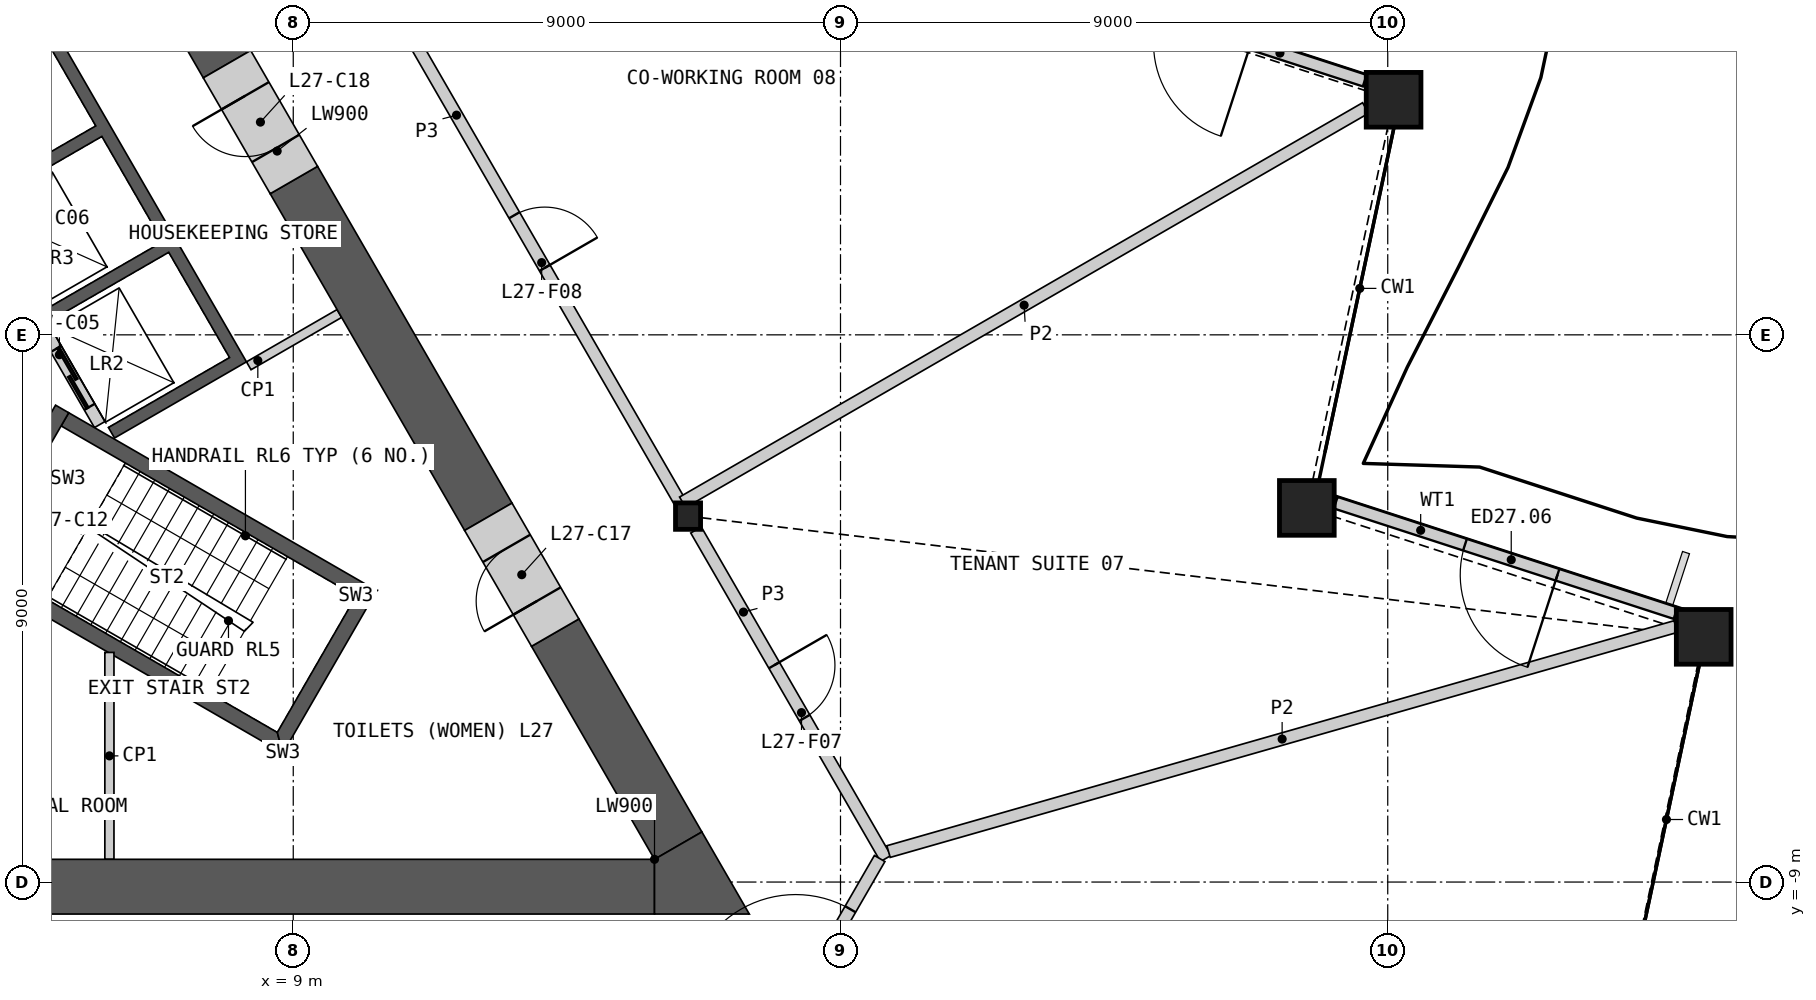
"""IFC4 building model, lengths in metres.
Left out: names, types, materials, properties, quantities, classifications, styles, units other than length and angle.
Written with IfcOpenShell. Run it as: python <this file> out.ifc"""

import sys

from ifc_helpers import new_model, si_unit, direction, frame, frame_2d, origin, origin_2d, place, context, subcontext, project, spatial, polyline, rectangle, hollow_rectangle, i_section, outline, extrude, element, fill, save


model = new_model("IFC4")
c1 = context("Model", 3, precision=1e-05, world=origin(), true_north=direction((0.0, 1.0)))
c2 = subcontext(c1, "Body", "Model", "MODEL_VIEW")
j1 = project(units=[si_unit("LENGTHUNIT", "METRE"), si_unit("PLANEANGLEUNIT", "RADIAN")], contexts=[c1])
p1 = place(None, origin())
s1 = spatial("IfcSite", under=j1, at=p1, CompositionType="ELEMENT")
p2 = place(p1, origin())
s2 = spatial("IfcBuilding", under=s1, at=p2, CompositionType="ELEMENT")
p3 = place(p2, frame((0.0, 0.0, 129.0)))
s3 = spatial("IfcBuildingStorey", under=s2, at=p3, CompositionType="ELEMENT", Elevation=129.0)
for number, where, z_axis, x_axis in (
    (1, (32.196, -4.967, 0.0), (0.0, 0.0, 1.0), (1.0, 0.0, 0.0)),
    (2, (25.669, -2.846, 0.0), (0.0, 0.0, 1.0), (1.0, 0.0, 0.0)),
    (3, (27.096, 3.866, 0.0), (0.0, 0.0, 1.0), (1.0, 0.0, 0.0)),
):
    element("IfcColumn", number, at=place(p3, frame(where, z_axis=z_axis, x_axis=x_axis)), inside=s3, PredefinedType="COLUMN", context=c2, shape_type="SweptSolid", body=[
        extrude(hollow_rectangle(XDim=0.9, YDim=0.9, WallThickness=0.06, at=origin_2d()), origin(), (0.0, 0.0, 1.0), 4.2),
    ])
p4 = place(p3, frame((15.493, -2.982, 0.0), z_axis=(0.0, 0.0, 1.0), x_axis=(1.0, 0.0, 0.0)))
e4 = element("IfcColumn", 4, at=p4, inside=s3, PredefinedType="COLUMN", context=c2, shape_type="SweptSolid", body=[
    extrude(i_section(OverallWidth=0.412, OverallDepth=0.435, WebThickness=0.036, FlangeThickness=0.057, at=origin_2d()), origin(), (0.0, 0.0, 1.0), 4.2),
])
p5 = place(p3, frame((31.734, -4.577, 0.0), z_axis=(0.0, 0.0, 1.0), x_axis=(-0.951060927669, 0.309003417231, 0.0)))
e5 = element("IfcWall", 5, at=p5, inside=s3, PredefinedType="SOLIDWALL", context=c2, shape_type="SweptSolid", body=[
    extrude(rectangle(XDim=5.877, YDim=0.2, at=frame_2d((2.939, 0.0))), origin(), (0.0, 0.0, 1.0), 3.189),
])
p6 = place(p5, frame((2.042, 0.0, 0.0)))
e6 = element("IfcOpeningElement", 6, at=p6, cuts=e5, PredefinedType="OPENING", context=c2, shape_type="SweptSolid", body=[
    extrude(rectangle(XDim=1.6, YDim=2.4, at=frame_2d((0.8, 1.2))), frame((0.0, 0.11, 0.0), z_axis=(0.0, -1.0, 0.0), x_axis=(1.0, 0.0, 0.0)), (0.0, 0.0, 1.0), 0.22),
])
p7 = place(p3, frame((26.622, 4.181, 0.0), z_axis=(0.0, 0.0, 1.0), x_axis=(-0.951053952554, 0.309024884649, 0.0)))
e7 = element("IfcWall", 7, at=p7, inside=s3, PredefinedType="SOLIDWALL", context=c2, shape_type="SweptSolid", body=[
    extrude(rectangle(XDim=5.865, YDim=0.2, at=frame_2d((2.932, 0.0))), origin(), (0.0, 0.0, 1.0), 3.189),
])
p8 = place(p7, frame((1.969, 0.0, 0.0)))
e8 = element("IfcOpeningElement", 8, at=p8, cuts=e7, PredefinedType="OPENING", context=c2, shape_type="SweptSolid", body=[
    extrude(rectangle(XDim=1.6, YDim=2.4, at=frame_2d((0.8, 1.2))), frame((0.0, 0.11, 0.0), z_axis=(0.0, -1.0, 0.0), x_axis=(1.0, 0.0, 0.0)), (0.0, 0.0, 1.0), 0.22),
])
p9 = place(p3, origin())
e9 = element("IfcWall", 9, at=p9, inside=s3, PredefinedType="SHEAR", context=c2, shape_type="SweptSolid", body=[
    extrude(outline(polyline([(2.66, 4.192), (4.831, 5.445), (8.231, -0.444), (6.061, -1.697), (5.96, -1.524), (7.952, -0.374), (6.952, 1.358), (4.96, 0.208), (4.861, 0.381), (6.852, 1.531), (5.852, 3.263), (3.861, 2.113), (3.76, 2.287), (5.752, 3.437), (4.752, 5.169), (2.76, 4.019), (2.66, 4.192)])), origin(), (0.0, 0.0, 1.0), 3.8),
])
p10 = place(p3, frame((5.817, -1.476, 0.0), z_axis=(0.0, 0.0, 1.0), x_axis=(-0.500002616675, 0.866023893041, 0.0)))
e10 = element("IfcWall", 10, at=p10, inside=s3, PredefinedType="SOLIDWALL", context=c2, shape_type="SweptSolid", body=[
    extrude(rectangle(XDim=8.373, YDim=0.2, at=frame_2d((4.187, 0.0))), origin(), (0.0, 0.0, 1.0), 3.8),
])
p11 = place(p10, frame((0.337, 0.0, 0.0)))
e11 = element("IfcOpeningElement", 11, at=p11, cuts=e10, PredefinedType="OPENING", context=c2, shape_type="SweptSolid", body=[
    extrude(rectangle(XDim=1.1, YDim=2.1, at=frame_2d((0.55, 1.05))), frame((0.0, 0.11, 0.0), z_axis=(0.0, -1.0, 0.0), x_axis=(1.0, 0.0, 0.0)), (0.0, 0.0, 1.0), 0.22),
])
p12 = place(p10, frame((2.537, 0.0, 0.0)))
e12 = element("IfcOpeningElement", 12, at=p12, cuts=e10, PredefinedType="OPENING", context=c2, shape_type="SweptSolid", body=[
    extrude(rectangle(XDim=1.1, YDim=2.1, at=frame_2d((0.55, 1.05))), frame((0.0, 0.11, 0.0), z_axis=(0.0, -1.0, 0.0), x_axis=(1.0, 0.0, 0.0)), (0.0, 0.0, 1.0), 0.22),
])
p13 = place(p10, frame((4.737, 0.0, 0.0)))
e13 = element("IfcOpeningElement", 13, at=p13, cuts=e10, PredefinedType="OPENING", context=c2, shape_type="SweptSolid", body=[
    extrude(rectangle(XDim=1.1, YDim=2.1, at=frame_2d((0.55, 1.05))), frame((0.0, 0.11, 0.0), z_axis=(0.0, -1.0, 0.0), x_axis=(1.0, 0.0, 0.0)), (0.0, 0.0, 1.0), 0.22),
])
p14 = place(p10, frame((7.037, 0.0, 0.0)))
e14 = element("IfcOpeningElement", 14, at=p14, cuts=e10, PredefinedType="OPENING", context=c2, shape_type="SweptSolid", body=[
    extrude(rectangle(XDim=0.9, YDim=2.1, at=frame_2d((0.45, 1.05))), frame((0.0, 0.11, 0.0), z_axis=(0.0, -1.0, 0.0), x_axis=(1.0, 0.0, 0.0)), (0.0, 0.0, 1.0), 0.22),
])
p15 = place(p3, origin())
e15 = element("IfcWall", 15, at=p15, inside=s3, PredefinedType="SHEAR", context=c2, shape_type="SweptSolid", body=[
    extrude(outline(polyline([(3.763, -3.956), (8.83, -6.881), (8.738, -6.539), (3.888, -3.739), (3.763, -3.956)])), origin(), (0.0, 0.0, 1.0), 3.8),
])
p16 = place(p3, origin())
e16 = element("IfcWall", 16, at=p16, inside=s3, PredefinedType="SHEAR", context=c2, shape_type="SweptSolid", body=[
    extrude(outline(polyline([(8.83, -6.881), (10.374, -4.206), (10.032, -4.298), (8.738, -6.539), (8.83, -6.881)])), origin(), (0.0, 0.0, 1.0), 3.8),
])
p17 = place(p3, origin())
e17 = element("IfcWall", 17, at=p17, inside=s3, PredefinedType="SHEAR", context=c2, shape_type="SweptSolid", body=[
    extrude(outline(polyline([(10.032, -4.298), (10.374, -4.206), (5.307, -1.281), (5.182, -1.498), (10.032, -4.298)])), origin(), (0.0, 0.0, 1.0), 3.8),
])
p18 = place(p3, frame((3.655, -3.893, 0.0), z_axis=(0.0, 0.0, 1.0), x_axis=(0.499982516597, 0.866035497597, 0.0)))
e18 = element("IfcWall", 18, at=p18, inside=s3, PredefinedType="SHEAR", context=c2, shape_type="SweptSolid", body=[
    extrude(rectangle(XDim=3.088, YDim=0.25, at=frame_2d((1.544, 0.0))), origin(), (0.0, 0.0, 1.0), 3.8),
])
p19 = place(p18, frame((0.994, 0.0, 0.0)))
e19 = element("IfcOpeningElement", 19, at=p19, cuts=e18, PredefinedType="OPENING", context=c2, shape_type="SweptSolid", body=[
    extrude(rectangle(XDim=1.1, YDim=2.1, at=frame_2d((0.55, 1.05))), frame((0.0, 0.135, 0.0), z_axis=(0.0, -1.0, 0.0), x_axis=(1.0, 0.0, 0.0)), (0.0, 0.0, 1.0), 0.27),
])
p20 = place(p3, frame((8.268, -0.509, 0.0), z_axis=(0.0, 0.0, 1.0), x_axis=(0.866024871741, 0.500000921525, 0.0)))
e20 = element("IfcWall", 20, at=p20, inside=s3, PredefinedType="PARTITIONING", context=c2, shape_type="SweptSolid", body=[
    extrude(rectangle(XDim=1.72, YDim=0.15, at=frame_2d((0.86, 0.0))), origin(), (0.0, 0.0, 1.0), 3.8),
])
p21 = place(p3, frame((5.977, -8.626, 0.0), z_axis=(0.0, 0.0, 1.0), x_axis=(0.0, 1.0, 0.0)))
e21 = element("IfcWall", 21, at=p21, inside=s3, PredefinedType="PARTITIONING", context=c2, shape_type="SweptSolid", body=[
    extrude(rectangle(XDim=3.403, YDim=0.15, at=frame_2d((1.701, 0.0))), origin(), (0.0, 0.0, 1.0), 3.8),
])
p22 = place(p3, frame((3.913, -9.076, 0.0), z_axis=(0.0, 0.0, 1.0), x_axis=(1.0, 0.0, 0.0)))
e22 = element("IfcWall", 22, at=p22, inside=s3, PredefinedType="SHEAR", context=c2, shape_type="SweptSolid", body=[
    extrude(rectangle(XDim=11.029, YDim=0.9, at=frame_2d((5.514, 0.0))), origin(), (0.0, 0.0, 1.0), 3.8),
])
p23 = place(p3, frame((7.91, 4.451, 0.0), z_axis=(0.0, 0.0, 1.0), x_axis=(-0.500001962043, 0.866024270995, 0.0)))
e23 = element("IfcWall", 23, at=p23, inside=s3, PredefinedType="SHEAR", context=c2, shape_type="SweptSolid", body=[
    extrude(rectangle(XDim=8.796, YDim=0.9, at=frame_2d((4.398, 0.0))), origin(), (0.0, 0.0, 1.0), 3.8),
])
p24 = place(p3, frame((12.208, -2.992, 0.0), z_axis=(0.0, 0.0, 1.0), x_axis=(-0.499990106751, 0.866031115579, 0.0)))
e24 = element("IfcWall", 24, at=p24, inside=s3, PredefinedType="SHEAR", context=c2, shape_type="SweptSolid", body=[
    extrude(rectangle(XDim=6.396, YDim=0.9, at=frame_2d((3.198, 0.0))), origin(), (0.0, 0.0, 1.0), 3.8),
])
p25 = place(p3, frame((15.331, -8.401, 0.0), z_axis=(0.0, 0.0, 1.0), x_axis=(-0.499974938593, 0.866039872511, 0.0)))
e25 = element("IfcWall", 25, at=p25, inside=s3, PredefinedType="SHEAR", context=c2, shape_type="SweptSolid", body=[
    extrude(rectangle(XDim=4.046, YDim=0.9, at=frame_2d((2.023, 0.0))), origin(), (0.0, 0.0, 1.0), 3.8),
])
p26 = place(p3, origin())
e26 = element("IfcWall", 26, at=p26, inside=s3, PredefinedType="SHEAR", context=c2, shape_type="SweptSolid", body=[
    extrude(outline(polyline([(14.941, -8.626), (15.721, -8.176), (16.5, -9.526), (14.941, -9.526), (14.941, -8.626)])), origin(), (0.0, 0.0, 1.0), 3.8),
])
p27 = place(p3, frame((13.308, -4.898, 0.0), z_axis=(0.0, 0.0, 1.0), x_axis=(-0.50002983664, 0.866008176907, 0.0)))
e27 = element("IfcWall", 27, at=p27, inside=s3, PredefinedType="SHEAR", context=c2, shape_type="SweptSolid", body=[
    extrude(rectangle(XDim=2.2, YDim=0.9, at=frame_2d((1.1, 0.0))), origin(), (0.0, 0.0, 1.0), 3.8),
])
p28 = place(p27, frame((0.6, 0.0, 0.0)))
e28 = element("IfcOpeningElement", 28, at=p28, cuts=e27, PredefinedType="OPENING", context=c2, shape_type="SweptSolid", body=[
    extrude(rectangle(XDim=1.0, YDim=2.1, at=frame_2d((0.5, 1.05))), frame((0.0, 0.46, 0.0), z_axis=(0.0, -1.0, 0.0), x_axis=(1.0, 0.0, 0.0)), (0.0, 0.0, 1.0), 0.92),
])
p29 = place(p3, frame((9.01, 2.546, 0.0), z_axis=(0.0, 0.0, 1.0), x_axis=(-0.499994660107, 0.866028486751, 0.0)))
e29 = element("IfcWall", 29, at=p29, inside=s3, PredefinedType="SHEAR", context=c2, shape_type="SweptSolid", body=[
    extrude(rectangle(XDim=2.2, YDim=0.9, at=frame_2d((1.1, 0.0))), origin(), (0.0, 0.0, 1.0), 3.8),
])
p30 = place(p29, frame((0.6, 0.0, 0.0)))
e30 = element("IfcOpeningElement", 30, at=p30, cuts=e29, PredefinedType="OPENING", context=c2, shape_type="SweptSolid", body=[
    extrude(rectangle(XDim=1.0, YDim=2.1, at=frame_2d((0.5, 1.05))), frame((0.0, 0.46, 0.0), z_axis=(0.0, -1.0, 0.0), x_axis=(1.0, 0.0, 0.0)), (0.0, 0.0, 1.0), 0.92),
])
p31 = place(p3, frame((10.46, 5.736, 0.0), z_axis=(0.0, 0.0, 1.0), x_axis=(0.500004141693, -0.866023012564, 0.0)))
e31 = element("IfcWall", 31, at=p31, inside=s3, PredefinedType="PARTITIONING", context=c2, shape_type="SweptSolid", body=[
    extrude(rectangle(XDim=9.803, YDim=0.2, at=frame_2d((4.902, 0.0))), origin(), (0.0, 0.0, 1.0), 3.8),
])
p32 = place(p31, frame((4.352, 0.0, 0.0)))
e32 = element("IfcOpeningElement", 32, at=p32, cuts=e31, PredefinedType="OPENING", context=c2, shape_type="SweptSolid", body=[
    extrude(rectangle(XDim=1.0, YDim=2.1, at=frame_2d((0.5, 1.05))), frame((0.0, 0.11, 0.0), z_axis=(0.0, -1.0, 0.0), x_axis=(1.0, 0.0, 0.0)), (0.0, 0.0, 1.0), 0.22),
])
p33 = place(p3, frame((15.624, -3.209, 0.0), z_axis=(0.0, 0.0, 1.0), x_axis=(0.499997920671, -0.866026604282, 0.0)))
e33 = element("IfcWall", 33, at=p33, inside=s3, PredefinedType="PARTITIONING", context=c2, shape_type="SweptSolid", body=[
    extrude(rectangle(XDim=6.24, YDim=0.2, at=frame_2d((3.12, 0.0))), origin(), (0.0, 0.0, 1.0), 3.8),
])
p34 = place(p33, frame((2.57, 0.0, 0.0)))
e34 = element("IfcOpeningElement", 34, at=p34, cuts=e33, PredefinedType="OPENING", context=c2, shape_type="SweptSolid", body=[
    extrude(rectangle(XDim=1.0, YDim=2.1, at=frame_2d((0.5, 1.05))), frame((0.0, 0.11, 0.0), z_axis=(0.0, -1.0, 0.0), x_axis=(1.0, 0.0, 0.0)), (0.0, 0.0, 1.0), 0.22),
])
p35 = place(p3, frame((16.781, -11.84, 0.0), z_axis=(0.0, 0.0, 1.0), x_axis=(0.499958791762, 0.866049194065, 0.0)))
e35 = element("IfcWall", 35, at=p35, inside=s3, PredefinedType="PARTITIONING", context=c2, shape_type="SweptSolid", body=[
    extrude(rectangle(XDim=3.726, YDim=0.2, at=frame_2d((1.863, 0.0))), origin(), (0.0, 0.0, 1.0), 3.8),
])
p36 = place(p35, frame((0.963, 0.0, 0.0)))
e36 = element("IfcOpeningElement", 36, at=p36, cuts=e35, PredefinedType="OPENING", context=c2, shape_type="SweptSolid", body=[
    extrude(rectangle(XDim=1.8, YDim=2.1, at=frame_2d((0.9, 1.05))), frame((0.0, 0.11, 0.0), z_axis=(0.0, -1.0, 0.0), x_axis=(1.0, 0.0, 0.0)), (0.0, 0.0, 1.0), 0.22),
])
p37 = place(p3, frame((18.79, -8.499, 0.0), z_axis=(0.0, 0.0, 1.0), x_axis=(0.961478776026, 0.274879179372, 0.0)))
e37 = element("IfcWall", 37, at=p37, inside=s3, PredefinedType="PARTITIONING", context=c2, shape_type="SweptSolid", body=[
    extrude(rectangle(XDim=13.465, YDim=0.2, at=frame_2d((6.732, 0.0))), origin(), (0.0, 0.0, 1.0), 2.885),
])
p38 = place(p3, frame((15.403, -2.754, 0.0), z_axis=(0.0, 0.0, 1.0), x_axis=(0.866024473704, 0.500001610943, 0.0)))
e38 = element("IfcWall", 38, at=p38, inside=s3, PredefinedType="PARTITIONING", context=c2, shape_type="SweptSolid", body=[
    extrude(rectangle(XDim=12.971, YDim=0.2, at=frame_2d((6.485, 0.0))), origin(), (0.0, 0.0, 1.0), 2.885),
])
p39 = place(p6, origin())
e39 = element("IfcDoor", 39, at=p39, inside=s3, OperationType="DOUBLE_DOOR_SINGLE_SWING", PredefinedType="DOOR", context=c2, shape_type="SweptSolid", body=[
    extrude(rectangle(XDim=1.6, YDim=2.4, at=frame_2d((0.8, 1.2))), frame((0.0, 0.025, 0.0), z_axis=(0.0, -1.0, 0.0), x_axis=(1.0, 0.0, 0.0)), (0.0, 0.0, 1.0), 0.05),
])
fill(e6, e39)
p40 = place(p11, origin())
e40 = element("IfcDoor", 40, at=p40, inside=s3, OperationType="SLIDING_TO_LEFT", PredefinedType="DOOR", context=c2, shape_type="SweptSolid", body=[
    extrude(rectangle(XDim=1.1, YDim=2.1, at=frame_2d((0.55, 1.05))), frame((0.0, 0.025, 0.0), z_axis=(0.0, -1.0, 0.0), x_axis=(1.0, 0.0, 0.0)), (0.0, 0.0, 1.0), 0.05),
])
fill(e11, e40)
p41 = place(p28, origin())
e41 = element("IfcDoor", 41, at=p41, inside=s3, OperationType="SINGLE_SWING_LEFT", PredefinedType="DOOR", context=c2, shape_type="SweptSolid", body=[
    extrude(rectangle(XDim=1.0, YDim=2.1, at=frame_2d((0.5, 1.05))), frame((0.0, 0.205, 0.0), z_axis=(0.0, -1.0, 0.0), x_axis=(1.0, 0.0, 0.0)), (0.0, 0.0, 1.0), 0.05),
])
fill(e28, e41)
p42 = place(p30, origin())
e42 = element("IfcDoor", 42, at=p42, inside=s3, OperationType="SINGLE_SWING_RIGHT", PredefinedType="DOOR", context=c2, shape_type="SweptSolid", body=[
    extrude(rectangle(XDim=1.0, YDim=2.1, at=frame_2d((0.5, 1.05))), frame((0.0, 0.205, 0.0), z_axis=(0.0, -1.0, 0.0), x_axis=(1.0, 0.0, 0.0)), (0.0, 0.0, 1.0), 0.05),
])
fill(e30, e42)
p43 = place(p36, origin())
e43 = element("IfcDoor", 43, at=p43, inside=s3, OperationType="DOUBLE_DOOR_SINGLE_SWING", PredefinedType="DOOR", context=c2, shape_type="SweptSolid", body=[
    extrude(rectangle(XDim=1.8, YDim=2.1, at=frame_2d((0.9, 1.05))), frame((0.0, 0.025, 0.0), z_axis=(0.0, -1.0, 0.0), x_axis=(1.0, 0.0, 0.0)), (0.0, 0.0, 1.0), 0.05),
])
fill(e36, e43)
p44 = place(p34, origin())
e44 = element("IfcDoor", 44, at=p44, inside=s3, OperationType="SINGLE_SWING_LEFT", PredefinedType="DOOR", context=c2, shape_type="SweptSolid", body=[
    extrude(rectangle(XDim=1.0, YDim=2.1, at=frame_2d((0.5, 1.05))), frame((0.0, 0.025, 0.0), z_axis=(0.0, -1.0, 0.0), x_axis=(1.0, 0.0, 0.0)), (0.0, 0.0, 1.0), 0.05),
])
fill(e34, e44)
p45 = place(p32, origin())
e45 = element("IfcDoor", 45, at=p45, inside=s3, OperationType="SINGLE_SWING_RIGHT", PredefinedType="DOOR", context=c2, shape_type="SweptSolid", body=[
    extrude(rectangle(XDim=1.0, YDim=2.1, at=frame_2d((0.5, 1.05))), frame((0.0, 0.025, 0.0), z_axis=(0.0, -1.0, 0.0), x_axis=(1.0, 0.0, 0.0)), (0.0, 0.0, 1.0), 0.05),
])
fill(e32, e45)
save(model, sys.argv[1])
